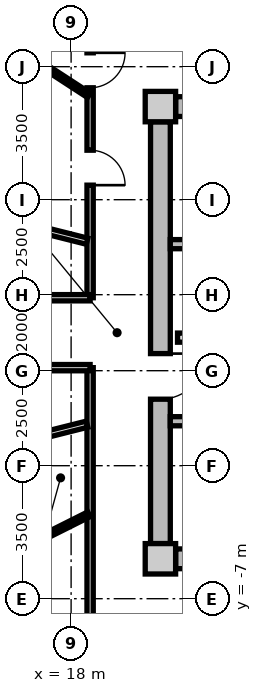
"""IFC4 building model, lengths in metres.
Left out: names, types, materials, properties, quantities, classifications, styles, units other than length and angle.
Written with IfcOpenShell. Run it as: python <this file> out.ifc"""

import sys

from ifc_helpers import new_model, si_unit, direction, frame, frame_2d, origin, origin_2d, place, context, subcontext, project, spatial, rectangle, extrude, source, transform, mapped, element, fill, save


model = new_model("IFC4")
c1 = context("Model", 3, precision=1e-05, world=origin(), true_north=direction((0.0, 1.0)))
c2 = subcontext(c1, "Body", "Model", "MODEL_VIEW")
j1 = project(units=[si_unit("LENGTHUNIT", "METRE"), si_unit("PLANEANGLEUNIT", "RADIAN")], contexts=[c1])
p1 = place(None, origin())
s1 = spatial("IfcSite", under=j1, at=p1, CompositionType="ELEMENT")
p2 = place(p1, origin())
s2 = spatial("IfcBuilding", under=s1, at=p2, CompositionType="ELEMENT")
p3 = place(p2, frame((0.0, 0.0, 213.9)))
s3 = spatial("IfcBuildingStorey", under=s2, at=p3, CompositionType="ELEMENT", Elevation=213.9)
m1 = source(origin(), c2, "Body", "SweptSolid", [
    extrude(rectangle(XDim=0.8, YDim=0.8, at=origin_2d()), origin(), (0.0, 0.0, 1.0), 3.05),
])
for number, where, z_axis, x_axis in (
    (1, (20.35, -5.95, 0.0), (0.0, 0.0, 1.0), (1.0, 0.0, 0.0)),
    (2, (20.35, 5.95, 0.0), (0.0, 0.0, 1.0), (1.0, 0.0, 0.0)),
):
    element("IfcColumn", number, at=place(p3, frame(where, z_axis=z_axis, x_axis=x_axis)), inside=s3, PredefinedType="COLUMN", context=c2, shape_type="MappedRepresentation", body=[
        mapped(m1, transform((0.0, 0.0, 0.0), x_axis=(1.0, 0.0, 0.0), y_axis=(0.0, 1.0, 0.0), z_axis=(0.0, 0.0, 1.0), scale=1.0)),
    ])
m2 = source(origin(), c2, "Body", "SweptSolid", [
    extrude(rectangle(XDim=14.5, YDim=0.52, at=frame_2d((7.25, 0.0))), origin(), (0.0, 0.0, 1.0), 2.76),
])
for number, where, z_axis, x_axis in (
    (3, (20.75, 5.95, 0.0), (0.0, 0.0, 1.0), (1.0, 0.0, 0.0)),
    (4, (35.25, -5.95, 0.0), (0.0, 0.0, 1.0), (-1.0, 0.0, 0.0)),
):
    element("IfcWall", number, at=place(p3, frame(where, z_axis=z_axis, x_axis=x_axis)), inside=s3, PredefinedType="SHEAR", context=c2, shape_type="MappedRepresentation", body=[
        mapped(m2, transform((0.0, 0.0, 0.0), x_axis=(1.0, 0.0, 0.0), y_axis=(0.0, 1.0, 0.0), z_axis=(0.0, 0.0, 1.0), scale=1.0)),
    ])
m3 = source(origin(), c2, "Body", "SweptSolid", [
    extrude(rectangle(XDim=11.1, YDim=0.52, at=frame_2d((5.55, 0.0))), origin(), (0.0, 0.0, 1.0), 2.76),
])
p4 = place(p3, frame((20.35, -5.55, 0.0), z_axis=(0.0, 0.0, 1.0), x_axis=(0.0, 1.0, 0.0)))
e5 = element("IfcWall", 5, at=p4, inside=s3, PredefinedType="SHEAR", context=c2, shape_type="MappedRepresentation", body=[
    mapped(m3, transform((0.0, 0.0, 0.0), x_axis=(1.0, 0.0, 0.0), y_axis=(0.0, 1.0, 0.0), z_axis=(0.0, 0.0, 1.0), scale=1.0)),
])
p5 = place(p4, frame((3.8, 0.0, 0.0)))
e6 = element("IfcOpeningElement", 6, at=p5, cuts=e5, PredefinedType="OPENING", context=c2, shape_type="SweptSolid", body=[
    extrude(rectangle(XDim=1.2, YDim=2.15, at=frame_2d((0.6, 1.075))), frame((0.0, 0.27, 0.0), z_axis=(0.0, -1.0, 0.0), x_axis=(1.0, 0.0, 0.0)), (0.0, 0.0, 1.0), 0.54),
])
m4 = source(origin(), c2, "Body", "SweptSolid", [
    extrude(rectangle(XDim=7.93, YDim=0.24, at=frame_2d((3.965, 0.0))), origin(), (0.0, 0.0, 1.0), 2.76),
])
p6 = place(p3, frame((20.61, 2.33, 0.0), z_axis=(0.0, 0.0, 1.0), x_axis=(1.0, 0.0, 0.0)))
e7 = element("IfcWall", 7, at=p6, inside=s3, PredefinedType="PARTITIONING", context=c2, shape_type="MappedRepresentation", body=[
    mapped(m4, transform((0.0, 0.0, 0.0), x_axis=(1.0, 0.0, 0.0), y_axis=(0.0, 1.0, 0.0), z_axis=(0.0, 0.0, 1.0), scale=1.0)),
])
p7 = place(p3, frame((20.61, -2.33, 0.0), z_axis=(0.0, 0.0, 1.0), x_axis=(1.0, 0.0, 0.0)))
e8 = element("IfcWall", 8, at=p7, inside=s3, PredefinedType="PARTITIONING", context=c2, shape_type="MappedRepresentation", body=[
    mapped(m4, transform((0.0, 0.0, 0.0), x_axis=(1.0, 0.0, 0.0), y_axis=(0.0, 1.0, 0.0), z_axis=(0.0, 0.0, 1.0), scale=1.0)),
])
p8 = place(p7, frame((1.05, 0.0, 0.0)))
e9 = element("IfcOpeningElement", 9, at=p8, cuts=e8, PredefinedType="OPENING", context=c2, shape_type="SweptSolid", body=[
    extrude(rectangle(XDim=1.1, YDim=2.15, at=frame_2d((0.55, 1.075))), frame((0.0, 0.13, 0.0), z_axis=(0.0, -1.0, 0.0), x_axis=(1.0, 0.0, 0.0)), (0.0, 0.0, 1.0), 0.26),
])
m5 = source(origin(), c2, "Body", "SweptSolid", [
    extrude(rectangle(XDim=7.62, YDim=0.24, at=frame_2d((3.81, 0.0))), origin(), (0.0, 0.0, 1.0), 2.745),
])
p9 = place(p3, frame((20.8, -0.13, 0.0), z_axis=(0.0, 0.0, 1.0), x_axis=(1.0, 0.0, 0.0)))
e10 = element("IfcWall", 10, at=p9, inside=s3, PredefinedType="PARTITIONING", context=c2, shape_type="MappedRepresentation", body=[
    mapped(m5, transform((0.0, 0.0, 0.0), x_axis=(1.0, 0.0, 0.0), y_axis=(0.0, 1.0, 0.0), z_axis=(0.0, 0.0, 1.0), scale=1.0)),
])
p10 = place(p9, frame((6.22, 0.0, 0.0)))
e11 = element("IfcOpeningElement", 11, at=p10, cuts=e10, PredefinedType="OPENING", context=c2, shape_type="SweptSolid", body=[
    extrude(rectangle(XDim=1.0, YDim=2.1, at=frame_2d((0.5, 1.05))), frame((0.0, 0.13, 0.0), z_axis=(0.0, -1.0, 0.0), x_axis=(1.0, 0.0, 0.0)), (0.0, 0.0, 1.0), 0.26),
])
p11 = place(p9, frame((2.4, 0.0, 0.0)))
e12 = element("IfcOpeningElement", 12, at=p11, cuts=e10, PredefinedType="OPENING", context=c2, shape_type="SweptSolid", body=[
    extrude(rectangle(XDim=1.0, YDim=2.1, at=frame_2d((0.5, 1.05))), frame((0.0, 0.13, 0.0), z_axis=(0.0, -1.0, 0.0), x_axis=(1.0, 0.0, 0.0)), (0.0, 0.0, 1.0), 0.26),
])
m6 = source(origin(), c2, "Body", "SweptSolid", [
    extrude(rectangle(XDim=6.88, YDim=0.165, at=frame_2d((3.44, 0.0))), origin(), (0.0, 0.0, 1.0), 2.745),
])
p12 = place(p3, frame((18.5, -7.8, 0.0), z_axis=(0.0, 0.0, 1.0), x_axis=(0.0, 1.0, 0.0)))
e13 = element("IfcWall", 13, at=p12, inside=s3, PredefinedType="PARTITIONING", context=c2, shape_type="MappedRepresentation", body=[
    mapped(m6, transform((0.0, 0.0, 0.0), x_axis=(1.0, 0.0, 0.0), y_axis=(0.0, 1.0, 0.0), z_axis=(0.0, 0.0, 1.0), scale=1.0)),
])
p13 = place(p3, frame((18.5, 0.92, 0.0), z_axis=(0.0, 0.0, 1.0), x_axis=(0.0, 1.0, 0.0)))
e14 = element("IfcWall", 14, at=p13, inside=s3, PredefinedType="PARTITIONING", context=c2, shape_type="MappedRepresentation", body=[
    mapped(m6, transform((0.0, 0.0, 0.0), x_axis=(1.0, 0.0, 0.0), y_axis=(0.0, 1.0, 0.0), z_axis=(0.0, 0.0, 1.0), scale=1.0)),
])
p14 = place(p13, frame((5.525, 0.0, 0.0)))
e15 = element("IfcOpeningElement", 15, at=p14, cuts=e14, PredefinedType="OPENING", context=c2, shape_type="SweptSolid", body=[
    extrude(rectangle(XDim=0.92, YDim=2.1, at=frame_2d((0.46, 1.05))), frame((0.0, 0.093, 0.0), z_axis=(0.0, -1.0, 0.0), x_axis=(1.0, 0.0, 0.0)), (0.0, 0.0, 1.0), 0.185),
])
p15 = place(p13, frame((2.962, 0.0, 0.0)))
e16 = element("IfcOpeningElement", 16, at=p15, cuts=e14, PredefinedType="OPENING", context=c2, shape_type="SweptSolid", body=[
    extrude(rectangle(XDim=0.92, YDim=2.1, at=frame_2d((0.46, 1.05))), frame((0.0, 0.093, 0.0), z_axis=(0.0, -1.0, 0.0), x_axis=(1.0, 0.0, 0.0)), (0.0, 0.0, 1.0), 0.185),
])
m7 = source(origin(), c2, "Body", "SweptSolid", [
    extrude(rectangle(XDim=6.157, YDim=0.165, at=frame_2d((3.079, 0.0))), origin(), (0.0, 0.0, 1.0), 2.345),
])
for number, where, z_axis, x_axis in (
    (17, (18.42, 2.407, 0.0), (0.0, 0.0, 1.0), (-0.97, 0.244, 0.0)),
    (18, (18.42, -2.407, 0.0), (0.0, 0.0, 1.0), (-0.97, -0.244, 0.0)),
):
    element("IfcWall", number, at=place(p3, frame(where, z_axis=z_axis, x_axis=x_axis)), inside=s3, PredefinedType="PARTITIONING", context=c2, shape_type="MappedRepresentation", body=[
        mapped(m7, transform((0.0, 0.0, 0.0), x_axis=(1.0, 0.0, 0.0), y_axis=(0.0, 1.0, 0.0), z_axis=(0.0, 0.0, 1.0), scale=1.0)),
    ])
m8 = source(origin(), c2, "Body", "SweptSolid", [
    extrude(rectangle(XDim=3.904, YDim=0.14, at=frame_2d((1.952, 0.0))), origin(), (0.0, 0.0, 1.0), 2.745),
])
p16 = place(p3, frame((18.47, 6.246, 0.0), z_axis=(0.0, 0.0, 1.0), x_axis=(-0.838024687996, 0.545632314209, 0.0)))
e19 = element("IfcWall", 19, at=p16, inside=s3, PredefinedType="PARTITIONING", context=c2, shape_type="MappedRepresentation", body=[
    mapped(m8, transform((0.0, 0.0, 0.0), x_axis=(1.0, 0.0, 0.0), y_axis=(0.0, 1.0, 0.0), z_axis=(0.0, 0.0, 1.0), scale=1.0)),
])
m9 = source(origin(), c2, "Body", "SweptSolid", [
    extrude(rectangle(XDim=1.638, YDim=0.14, at=frame_2d((0.819, 0.0))), origin(), (0.0, 0.0, 1.0), 2.745),
])
p17 = place(p3, frame((18.47, -4.778, 0.0), z_axis=(0.0, 0.0, 1.0), x_axis=(-0.893919977945, -0.448226586707, 0.0)))
e20 = element("IfcWall", 20, at=p17, inside=s3, PredefinedType="PARTITIONING", context=c2, shape_type="MappedRepresentation", body=[
    mapped(m9, transform((0.0, 0.0, 0.0), x_axis=(1.0, 0.0, 0.0), y_axis=(0.0, 1.0, 0.0), z_axis=(0.0, 0.0, 1.0), scale=1.0)),
])
m10 = source(origin(), c2, "Body", "SweptSolid", [
    extrude(rectangle(XDim=3.472, YDim=0.115, at=frame_2d((1.736, 0.0))), origin(), (0.0, 0.0, 1.0), 2.745),
])
p18 = place(p3, frame((16.396, -6.317, 0.0), z_axis=(0.0, 0.0, 1.0), x_axis=(0.485804139346, -0.874067696574, 0.0)))
e21 = element("IfcWall", 21, at=p18, inside=s3, PredefinedType="PARTITIONING", context=c2, shape_type="MappedRepresentation", body=[
    mapped(m10, transform((0.0, 0.0, 0.0), x_axis=(1.0, 0.0, 0.0), y_axis=(0.0, 1.0, 0.0), z_axis=(0.0, 0.0, 1.0), scale=1.0)),
])
p19 = place(p18, frame((1.261, 0.0, 0.0)))
e22 = element("IfcOpeningElement", 22, at=p19, cuts=e21, PredefinedType="OPENING", context=c2, shape_type="SweptSolid", body=[
    extrude(rectangle(XDim=0.95, YDim=2.1, at=frame_2d((0.475, 1.05))), frame((0.0, 0.067, 0.0), z_axis=(0.0, -1.0, 0.0), x_axis=(1.0, 0.0, 0.0)), (0.0, 0.0, 1.0), 0.135),
])
m11 = source(origin(), c2, "Body", "SweptSolid", [
    extrude(rectangle(XDim=37.0, YDim=0.165, at=frame_2d((18.5, 0.0))), origin(), (0.0, 0.0, 1.0), 2.745),
])
p20 = place(p3, frame((-18.5, -0.92, 0.0), z_axis=(0.0, 0.0, 1.0), x_axis=(1.0, 0.0, 0.0)))
e23 = element("IfcWall", 23, at=p20, inside=s3, PredefinedType="PARTITIONING", context=c2, shape_type="MappedRepresentation", body=[
    mapped(m11, transform((0.0, 0.0, 0.0), x_axis=(1.0, 0.0, 0.0), y_axis=(0.0, 1.0, 0.0), z_axis=(0.0, 0.0, 1.0), scale=1.0)),
])
p21 = place(p20, frame((2.662, 0.0, 0.0)))
e24 = element("IfcOpeningElement", 24, at=p21, cuts=e23, PredefinedType="OPENING", context=c2, shape_type="SweptSolid", body=[
    extrude(rectangle(XDim=0.95, YDim=2.1, at=frame_2d((0.475, 1.05))), frame((0.0, 0.093, 0.0), z_axis=(0.0, -1.0, 0.0), x_axis=(1.0, 0.0, 0.0)), (0.0, 0.0, 1.0), 0.185),
])
p22 = place(p20, frame((33.388, 0.0, 0.0)))
e25 = element("IfcOpeningElement", 25, at=p22, cuts=e23, PredefinedType="OPENING", context=c2, shape_type="SweptSolid", body=[
    extrude(rectangle(XDim=0.95, YDim=2.1, at=frame_2d((0.475, 1.05))), frame((0.0, 0.093, 0.0), z_axis=(0.0, -1.0, 0.0), x_axis=(1.0, 0.0, 0.0)), (0.0, 0.0, 1.0), 0.185),
])
p23 = place(p20, frame((9.075, 0.0, 0.0)))
e26 = element("IfcOpeningElement", 26, at=p23, cuts=e23, PredefinedType="OPENING", context=c2, shape_type="SweptSolid", body=[
    extrude(rectangle(XDim=1.25, YDim=2.2, at=frame_2d((0.625, 1.1))), frame((0.0, 0.093, 0.0), z_axis=(0.0, -1.0, 0.0), x_axis=(1.0, 0.0, 0.0)), (0.0, 0.0, 1.0), 0.185),
])
p24 = place(p20, frame((14.875, 0.0, 0.0)))
e27 = element("IfcOpeningElement", 27, at=p24, cuts=e23, PredefinedType="OPENING", context=c2, shape_type="SweptSolid", body=[
    extrude(rectangle(XDim=1.25, YDim=2.2, at=frame_2d((0.625, 1.1))), frame((0.0, 0.093, 0.0), z_axis=(0.0, -1.0, 0.0), x_axis=(1.0, 0.0, 0.0)), (0.0, 0.0, 1.0), 0.185),
])
p25 = place(p20, frame((20.875, 0.0, 0.0)))
e28 = element("IfcOpeningElement", 28, at=p25, cuts=e23, PredefinedType="OPENING", context=c2, shape_type="SweptSolid", body=[
    extrude(rectangle(XDim=1.25, YDim=2.2, at=frame_2d((0.625, 1.1))), frame((0.0, 0.093, 0.0), z_axis=(0.0, -1.0, 0.0), x_axis=(1.0, 0.0, 0.0)), (0.0, 0.0, 1.0), 0.185),
])
p26 = place(p20, frame((26.675, 0.0, 0.0)))
e29 = element("IfcOpeningElement", 29, at=p26, cuts=e23, PredefinedType="OPENING", context=c2, shape_type="SweptSolid", body=[
    extrude(rectangle(XDim=1.25, YDim=2.2, at=frame_2d((0.625, 1.1))), frame((0.0, 0.093, 0.0), z_axis=(0.0, -1.0, 0.0), x_axis=(1.0, 0.0, 0.0)), (0.0, 0.0, 1.0), 0.185),
])
p27 = place(p3, frame((-18.5, 0.92, 0.0), z_axis=(0.0, 0.0, 1.0), x_axis=(1.0, 0.0, 0.0)))
e30 = element("IfcWall", 30, at=p27, inside=s3, PredefinedType="PARTITIONING", context=c2, shape_type="MappedRepresentation", body=[
    mapped(m11, transform((0.0, 0.0, 0.0), x_axis=(1.0, 0.0, 0.0), y_axis=(0.0, 1.0, 0.0), z_axis=(0.0, 0.0, 1.0), scale=1.0)),
])
p28 = place(p27, frame((2.662, 0.0, 0.0)))
e31 = element("IfcOpeningElement", 31, at=p28, cuts=e30, PredefinedType="OPENING", context=c2, shape_type="SweptSolid", body=[
    extrude(rectangle(XDim=0.95, YDim=2.1, at=frame_2d((0.475, 1.05))), frame((0.0, 0.093, 0.0), z_axis=(0.0, -1.0, 0.0), x_axis=(1.0, 0.0, 0.0)), (0.0, 0.0, 1.0), 0.185),
])
p29 = place(p27, frame((33.388, 0.0, 0.0)))
e32 = element("IfcOpeningElement", 32, at=p29, cuts=e30, PredefinedType="OPENING", context=c2, shape_type="SweptSolid", body=[
    extrude(rectangle(XDim=0.95, YDim=2.1, at=frame_2d((0.475, 1.05))), frame((0.0, 0.093, 0.0), z_axis=(0.0, -1.0, 0.0), x_axis=(1.0, 0.0, 0.0)), (0.0, 0.0, 1.0), 0.185),
])
p30 = place(p27, frame((7.64, 0.0, 0.0)))
e33 = element("IfcOpeningElement", 33, at=p30, cuts=e30, PredefinedType="OPENING", context=c2, shape_type="SweptSolid", body=[
    extrude(rectangle(XDim=0.92, YDim=2.1, at=frame_2d((0.46, 1.05))), frame((0.0, 0.093, 0.0), z_axis=(0.0, -1.0, 0.0), x_axis=(1.0, 0.0, 0.0)), (0.0, 0.0, 1.0), 0.185),
])
p31 = place(p27, frame((10.275, 0.0, 0.0)))
e34 = element("IfcOpeningElement", 34, at=p31, cuts=e30, PredefinedType="OPENING", context=c2, shape_type="SweptSolid", body=[
    extrude(rectangle(XDim=1.25, YDim=2.2, at=frame_2d((0.625, 1.1))), frame((0.0, 0.093, 0.0), z_axis=(0.0, -1.0, 0.0), x_axis=(1.0, 0.0, 0.0)), (0.0, 0.0, 1.0), 0.185),
])
p32 = place(p27, frame((14.875, 0.0, 0.0)))
e35 = element("IfcOpeningElement", 35, at=p32, cuts=e30, PredefinedType="OPENING", context=c2, shape_type="SweptSolid", body=[
    extrude(rectangle(XDim=1.25, YDim=2.2, at=frame_2d((0.625, 1.1))), frame((0.0, 0.093, 0.0), z_axis=(0.0, -1.0, 0.0), x_axis=(1.0, 0.0, 0.0)), (0.0, 0.0, 1.0), 0.185),
])
p33 = place(p27, frame((20.875, 0.0, 0.0)))
e36 = element("IfcOpeningElement", 36, at=p33, cuts=e30, PredefinedType="OPENING", context=c2, shape_type="SweptSolid", body=[
    extrude(rectangle(XDim=1.25, YDim=2.2, at=frame_2d((0.625, 1.1))), frame((0.0, 0.093, 0.0), z_axis=(0.0, -1.0, 0.0), x_axis=(1.0, 0.0, 0.0)), (0.0, 0.0, 1.0), 0.185),
])
p34 = place(p27, frame((26.675, 0.0, 0.0)))
e37 = element("IfcOpeningElement", 37, at=p34, cuts=e30, PredefinedType="OPENING", context=c2, shape_type="SweptSolid", body=[
    extrude(rectangle(XDim=1.25, YDim=2.2, at=frame_2d((0.625, 1.1))), frame((0.0, 0.093, 0.0), z_axis=(0.0, -1.0, 0.0), x_axis=(1.0, 0.0, 0.0)), (0.0, 0.0, 1.0), 0.185),
])
m12 = source(origin(), c2, "Body", "SweptSolid", [
    extrude(rectangle(XDim=1.2, YDim=2.15, at=frame_2d((0.6, 1.075))), frame((0.0, 0.025, 0.0), z_axis=(0.0, -1.0, 0.0), x_axis=(1.0, 0.0, 0.0)), (0.0, 0.0, 1.0), 0.05),
])
p35 = place(p5, frame((1.2, 0.0, 0.0), z_axis=(0.0, 0.0, 1.0), x_axis=(-1.0, 0.0, 0.0)))
e38 = element("IfcDoor", 38, at=p35, inside=s3, OperationType="SINGLE_SWING_LEFT", PredefinedType="DOOR", context=c2, shape_type="MappedRepresentation", body=[
    mapped(m12, transform((0.0, 0.0, 0.0), x_axis=(1.0, 0.0, 0.0), y_axis=(0.0, 1.0, 0.0), z_axis=(0.0, 0.0, 1.0), scale=1.0)),
])
fill(e6, e38)
m13 = source(origin(), c2, "Body", "SweptSolid", [
    extrude(rectangle(XDim=0.92, YDim=2.1, at=frame_2d((0.46, 1.05))), frame((0.0, 0.025, 0.0), z_axis=(0.0, -1.0, 0.0), x_axis=(1.0, 0.0, 0.0)), (0.0, 0.0, 1.0), 0.05),
])
p36 = place(p14, frame((0.92, 0.0, 0.0), z_axis=(0.0, 0.0, 1.0), x_axis=(-1.0, 0.0, 0.0)))
e39 = element("IfcDoor", 39, at=p36, inside=s3, OperationType="SINGLE_SWING_LEFT", PredefinedType="DOOR", context=c2, shape_type="MappedRepresentation", body=[
    mapped(m13, transform((0.0, 0.0, 0.0), x_axis=(1.0, 0.0, 0.0), y_axis=(0.0, 1.0, 0.0), z_axis=(0.0, 0.0, 1.0), scale=1.0)),
])
fill(e15, e39)
p37 = place(p15, frame((0.92, 0.0, 0.0), z_axis=(0.0, 0.0, 1.0), x_axis=(-1.0, 0.0, 0.0)))
e40 = element("IfcDoor", 40, at=p37, inside=s3, OperationType="SINGLE_SWING_RIGHT", PredefinedType="DOOR", context=c2, shape_type="MappedRepresentation", body=[
    mapped(m13, transform((0.0, 0.0, 0.0), x_axis=(1.0, 0.0, 0.0), y_axis=(0.0, 1.0, 0.0), z_axis=(0.0, 0.0, 1.0), scale=1.0)),
])
fill(e16, e40)
save(model, sys.argv[1])
